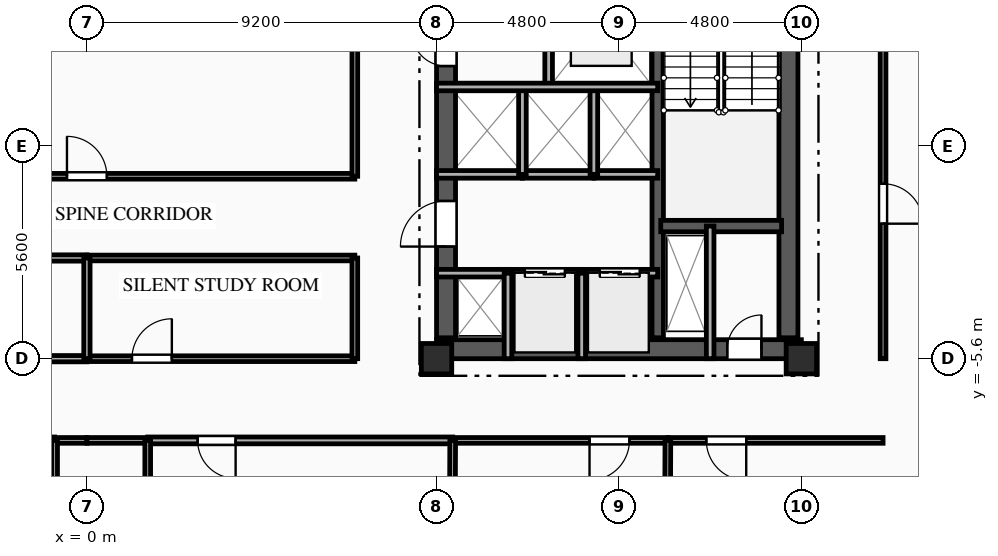
"""IFC4 building model, lengths in metres.
Left out: names, types, materials, properties, quantities, classifications, styles, units other than length and angle.
Written with IfcOpenShell. Run it as: python <this file> out.ifc"""

import sys

from ifc_helpers import new_model, si_unit, direction, frame, frame_2d, origin, origin_2d, place, context, subcontext, project, spatial, rectangle, extrude, element, fill, save


model = new_model("IFC4")
c1 = context("Model", 3, precision=1e-05, world=origin(), true_north=direction((0.0, 1.0)))
c2 = subcontext(c1, "Body", "Model", "MODEL_VIEW")
j1 = project(units=[si_unit("LENGTHUNIT", "METRE"), si_unit("PLANEANGLEUNIT", "RADIAN")], contexts=[c1])
p1 = place(None, origin())
s1 = spatial("IfcSite", under=j1, at=p1, CompositionType="ELEMENT")
p2 = place(p1, origin())
s2 = spatial("IfcBuilding", under=s1, at=p2, CompositionType="ELEMENT")
p3 = place(p2, frame((0.0, 0.0, 186.35)))
s3 = spatial("IfcBuildingStorey", under=s2, at=p3, CompositionType="ELEMENT", Elevation=186.35)
for number, where, z_axis, x_axis in (
    (1, (9.2, -5.6, 0.0), (0.0, 0.0, 1.0), (1.0, 0.0, 0.0)),
    (2, (18.8, -5.6, 0.0), (0.0, 0.0, 1.0), (1.0, 0.0, 0.0)),
):
    element("IfcColumn", number, at=place(p3, frame(where, z_axis=z_axis, x_axis=x_axis)), inside=s3, PredefinedType="COLUMN", context=c2, shape_type="SweptSolid", body=[
        extrude(rectangle(XDim=0.8, YDim=0.8, at=origin_2d()), origin(), (0.0, 0.0, 1.0), 3.35),
    ])
p4 = place(p3, frame((9.2, -5.35, 0.0), z_axis=(0.0, 0.0, 1.0), x_axis=(1.0, 0.0, 0.0)))
e3 = element("IfcWall", 3, at=p4, inside=s3, PredefinedType="SHEAR", context=c2, shape_type="SweptSolid", body=[
    extrude(rectangle(XDim=9.6, YDim=0.5, at=frame_2d((4.8, 0.0))), origin(), (0.0, 0.0, 1.0), 3.04),
])
p5 = place(p4, frame((7.65, 0.0, 0.0)))
e4 = element("IfcOpeningElement", 4, at=p5, cuts=e3, PredefinedType="OPENING", context=c2, shape_type="SweptSolid", body=[
    extrude(rectangle(XDim=0.9, YDim=2.1, at=frame_2d((0.45, 1.05))), frame((0.0, 0.26, 0.0), z_axis=(0.0, -1.0, 0.0), x_axis=(1.0, 0.0, 0.0)), (0.0, 0.0, 1.0), 0.52),
])
p6 = place(p3, frame((9.45, -5.05, 0.0), z_axis=(0.0, 0.0, 1.0), x_axis=(0.0, 1.0, 0.0)))
e5 = element("IfcWall", 5, at=p6, inside=s3, PredefinedType="SHEAR", context=c2, shape_type="SweptSolid", body=[
    extrude(rectangle(XDim=10.1, YDim=0.5, at=frame_2d((5.05, 0.0))), origin(), (0.0, 0.0, 1.0), 3.04),
])
p7 = place(p6, frame((7.15, 0.0, 0.0)))
e6 = element("IfcOpeningElement", 6, at=p7, cuts=e5, PredefinedType="OPENING", context=c2, shape_type="SweptSolid", body=[
    extrude(rectangle(XDim=0.9, YDim=2.1, at=frame_2d((0.45, 1.05))), frame((0.0, 0.26, 0.0), z_axis=(0.0, -1.0, 0.0), x_axis=(1.0, 0.0, 0.0)), (0.0, 0.0, 1.0), 0.52),
])
p8 = place(p6, frame((2.4, 0.0, 0.0)))
e7 = element("IfcOpeningElement", 7, at=p8, cuts=e5, PredefinedType="OPENING", context=c2, shape_type="SweptSolid", body=[
    extrude(rectangle(XDim=1.2, YDim=2.15, at=frame_2d((0.6, 1.075))), frame((0.0, 0.26, 0.0), z_axis=(0.0, -1.0, 0.0), x_axis=(1.0, 0.0, 0.0)), (0.0, 0.0, 1.0), 0.52),
])
p9 = place(p3, frame((18.46, -5.05, 0.0), z_axis=(0.0, 0.0, 1.0), x_axis=(0.0, 1.0, 0.0)))
e8 = element("IfcWall", 8, at=p9, inside=s3, PredefinedType="SHEAR", context=c2, shape_type="SweptSolid", body=[
    extrude(rectangle(XDim=10.1, YDim=0.5, at=frame_2d((5.05, 0.0))), origin(), (0.0, 0.0, 1.0), 3.04),
])
p10 = place(p3, frame((15.02, -5.05, 0.0), z_axis=(0.0, 0.0, 1.0), x_axis=(0.0, 1.0, 0.0)))
e9 = element("IfcWall", 9, at=p10, inside=s3, PredefinedType="SHEAR", context=c2, shape_type="SweptSolid", body=[
    extrude(rectangle(XDim=10.1, YDim=0.3, at=frame_2d((5.05, 0.0))), origin(), (0.0, 0.0, 1.0), 3.04),
])
p11 = place(p3, frame((15.1, -2.11, 0.0), z_axis=(0.0, 0.0, 1.0), x_axis=(1.0, 0.0, 0.0)))
e10 = element("IfcWall", 10, at=p11, inside=s3, PredefinedType="SHEAR", context=c2, shape_type="SweptSolid", body=[
    extrude(rectangle(XDim=3.18, YDim=0.3, at=frame_2d((1.59, 0.0))), origin(), (0.0, 0.0, 1.0), 3.04),
])
p12 = place(p3, frame((16.4, -2.11, 0.0), z_axis=(0.0, 0.0, 1.0), x_axis=(0.0, -1.0, 0.0)))
e11 = element("IfcWall", 11, at=p12, inside=s3, PredefinedType="PARTITIONING", context=c2, shape_type="SweptSolid", body=[
    extrude(rectangle(XDim=3.49, YDim=0.2, at=frame_2d((1.745, 0.0))), origin(), (0.0, 0.0, 1.0), 3.04),
])
p13 = place(p3, frame((12.15, 5.6, 0.0), z_axis=(0.0, 0.0, 1.0), x_axis=(0.0, -1.0, 0.0)))
e12 = element("IfcWall", 12, at=p13, inside=s3, PredefinedType="PARTITIONING", context=c2, shape_type="SweptSolid", body=[
    extrude(rectangle(XDim=4.05, YDim=0.2, at=frame_2d((2.025, 0.0))), origin(), (0.0, 0.0, 1.0), 3.04),
])
p14 = place(p3, frame((9.2, -3.35, 0.0), z_axis=(0.0, 0.0, 1.0), x_axis=(1.0, 0.0, 0.0)))
e13 = element("IfcWall", 13, at=p14, inside=s3, PredefinedType="PARTITIONING", context=c2, shape_type="SweptSolid", body=[
    extrude(rectangle(XDim=1.88, YDim=0.2, at=frame_2d((0.94, 0.0))), origin(), (0.0, 0.0, 1.0), 2.755),
])
p15 = place(p3, frame((11.08, -3.35, 0.0), z_axis=(0.0, 0.0, 1.0), x_axis=(1.0, 0.0, 0.0)))
e14 = element("IfcWall", 14, at=p15, inside=s3, PredefinedType="PARTITIONING", context=c2, shape_type="SweptSolid", body=[
    extrude(rectangle(XDim=1.94, YDim=0.2, at=frame_2d((0.97, 0.0))), origin(), (0.0, 0.0, 1.0), 3.04),
])
p16 = place(p15, frame((0.445, 0.0, 0.0)))
e15 = element("IfcOpeningElement", 15, at=p16, cuts=e14, PredefinedType="OPENING", context=c2, shape_type="SweptSolid", body=[
    extrude(rectangle(XDim=1.05, YDim=2.1, at=frame_2d((0.525, 1.05))), frame((0.0, 0.11, 0.0), z_axis=(0.0, -1.0, 0.0), x_axis=(1.0, 0.0, 0.0)), (0.0, 0.0, 1.0), 0.22),
])
p17 = place(p3, frame((13.02, -3.35, 0.0), z_axis=(0.0, 0.0, 1.0), x_axis=(1.0, 0.0, 0.0)))
e16 = element("IfcWall", 16, at=p17, inside=s3, PredefinedType="PARTITIONING", context=c2, shape_type="SweptSolid", body=[
    extrude(rectangle(XDim=2.0, YDim=0.2, at=frame_2d((1.0, 0.0))), origin(), (0.0, 0.0, 1.0), 3.04),
])
p18 = place(p17, frame((0.475, 0.0, 0.0)))
e17 = element("IfcOpeningElement", 17, at=p18, cuts=e16, PredefinedType="OPENING", context=c2, shape_type="SweptSolid", body=[
    extrude(rectangle(XDim=1.05, YDim=2.1, at=frame_2d((0.525, 1.05))), frame((0.0, 0.11, 0.0), z_axis=(0.0, -1.0, 0.0), x_axis=(1.0, 0.0, 0.0)), (0.0, 0.0, 1.0), 0.22),
])
p19 = place(p3, frame((11.46, -0.75, 0.0), z_axis=(0.0, 0.0, 1.0), x_axis=(-1.0, 0.0, 0.0)))
e18 = element("IfcWall", 18, at=p19, inside=s3, PredefinedType="PARTITIONING", context=c2, shape_type="SweptSolid", body=[
    extrude(rectangle(XDim=2.26, YDim=0.2, at=frame_2d((1.13, 0.0))), origin(), (0.0, 0.0, 1.0), 3.04),
])
p20 = place(p3, frame((13.34, -0.75, 0.0), z_axis=(0.0, 0.0, 1.0), x_axis=(-1.0, 0.0, 0.0)))
e19 = element("IfcWall", 19, at=p20, inside=s3, PredefinedType="PARTITIONING", context=c2, shape_type="SweptSolid", body=[
    extrude(rectangle(XDim=1.88, YDim=0.2, at=frame_2d((0.94, 0.0))), origin(), (0.0, 0.0, 1.0), 3.04),
])
p21 = place(p3, frame((15.02, -0.75, 0.0), z_axis=(0.0, 0.0, 1.0), x_axis=(-1.0, 0.0, 0.0)))
e20 = element("IfcWall", 20, at=p21, inside=s3, PredefinedType="PARTITIONING", context=c2, shape_type="SweptSolid", body=[
    extrude(rectangle(XDim=1.68, YDim=0.2, at=frame_2d((0.84, 0.0))), origin(), (0.0, 0.0, 1.0), 3.04),
])
for number, where, z_axis, x_axis in (
    (21, (11.08, -5.6, 0.0), (0.0, 0.0, 1.0), (0.0, 1.0, 0.0)),
    (22, (13.02, -5.6, 0.0), (0.0, 0.0, 1.0), (0.0, 1.0, 0.0)),
):
    element("IfcWall", number, at=place(p3, frame(where, z_axis=z_axis, x_axis=x_axis)), inside=s3, PredefinedType="PARTITIONING", context=c2, shape_type="SweptSolid", body=[
        extrude(rectangle(XDim=2.25, YDim=0.2, at=frame_2d((1.125, 0.0))), origin(), (0.0, 0.0, 1.0), 3.04),
    ])
for number, where, z_axis, x_axis in (
    (23, (11.46, -0.75, 0.0), (0.0, 0.0, 1.0), (0.0, 1.0, 0.0)),
    (24, (13.34, -0.75, 0.0), (0.0, 0.0, 1.0), (0.0, 1.0, 0.0)),
):
    element("IfcWall", number, at=place(p3, frame(where, z_axis=z_axis, x_axis=x_axis)), inside=s3, PredefinedType="PARTITIONING", context=c2, shape_type="SweptSolid", body=[
        extrude(rectangle(XDim=2.3, YDim=0.2, at=frame_2d((1.15, 0.0))), origin(), (0.0, 0.0, 1.0), 3.04),
    ])
p22 = place(p3, frame((-0.85, -7.75, 0.0), z_axis=(0.0, 0.0, 1.0), x_axis=(-1.0, 0.0, 0.0)))
e25 = element("IfcWall", 25, at=p22, inside=s3, PredefinedType="PARTITIONING", context=c2, shape_type="SweptSolid", body=[
    extrude(rectangle(XDim=8.025, YDim=0.18, at=frame_2d((4.012, 0.0))), origin(), (0.0, 0.0, 1.0), 3.04),
])
p23 = place(p22, frame((1.313, 0.0, 0.0)))
e26 = element("IfcOpeningElement", 26, at=p23, cuts=e25, PredefinedType="OPENING", context=c2, shape_type="SweptSolid", body=[
    extrude(rectangle(XDim=1.0, YDim=2.15, at=frame_2d((0.5, 1.075))), frame((0.0, 0.1, 0.0), z_axis=(0.0, -1.0, 0.0), x_axis=(1.0, 0.0, 0.0)), (0.0, 0.0, 1.0), 0.2),
])
p24 = place(p3, frame((0.0, -7.75, 0.0), z_axis=(0.0, 0.0, 1.0), x_axis=(-1.0, 0.0, 0.0)))
e27 = element("IfcWall", 27, at=p24, inside=s3, PredefinedType="PLUMBINGWALL", context=c2, shape_type="SweptSolid", body=[
    extrude(rectangle(XDim=0.85, YDim=0.15, at=frame_2d((0.425, 0.0))), origin(), (0.0, 0.0, 1.0), 3.04),
])
p25 = place(p3, frame((-7.05, -5.6, 0.0), z_axis=(0.0, 0.0, 1.0), x_axis=(1.0, 0.0, 0.0)))
e28 = element("IfcWall", 28, at=p25, inside=s3, PredefinedType="PARTITIONING", context=c2, shape_type="SweptSolid", body=[
    extrude(rectangle(XDim=7.05, YDim=0.165, at=frame_2d((3.525, 0.0))), origin(), (0.0, 0.0, 1.0), 2.525),
])
p26 = place(p25, frame((4.728, 0.0, 0.0)))
e29 = element("IfcOpeningElement", 29, at=p26, cuts=e28, PredefinedType="OPENING", context=c2, shape_type="SweptSolid", body=[
    extrude(rectangle(XDim=1.15, YDim=2.15, at=frame_2d((0.575, 1.075))), frame((0.0, 0.093, 0.0), z_axis=(0.0, -1.0, 0.0), x_axis=(1.0, 0.0, 0.0)), (0.0, 0.0, 1.0), 0.185),
])
p27 = place(p3, frame((9.625, -7.75, 0.0), z_axis=(0.0, 0.0, 1.0), x_axis=(-1.0, 0.0, 0.0)))
e30 = element("IfcWall", 30, at=p27, inside=s3, PredefinedType="PARTITIONING", context=c2, shape_type="SweptSolid", body=[
    extrude(rectangle(XDim=8.025, YDim=0.18, at=frame_2d((4.012, 0.0))), origin(), (0.0, 0.0, 1.0), 3.04),
])
p28 = place(p27, frame((5.712, 0.0, 0.0)))
e31 = element("IfcOpeningElement", 31, at=p28, cuts=e30, PredefinedType="OPENING", context=c2, shape_type="SweptSolid", body=[
    extrude(rectangle(XDim=1.0, YDim=2.15, at=frame_2d((0.5, 1.075))), frame((0.0, 0.1, 0.0), z_axis=(0.0, -1.0, 0.0), x_axis=(1.0, 0.0, 0.0)), (0.0, 0.0, 1.0), 0.2),
])
p29 = place(p3, frame((1.6, -7.75, 0.0), z_axis=(0.0, 0.0, 1.0), x_axis=(-1.0, 0.0, 0.0)))
e32 = element("IfcWall", 32, at=p29, inside=s3, PredefinedType="PLUMBINGWALL", context=c2, shape_type="SweptSolid", body=[
    extrude(rectangle(XDim=1.6, YDim=0.15, at=frame_2d((0.8, 0.0))), origin(), (0.0, 0.0, 1.0), 3.04),
])
p30 = place(p3, frame((15.288, -7.75, 0.0), z_axis=(0.0, 0.0, 1.0), x_axis=(-1.0, 0.0, 0.0)))
e33 = element("IfcWall", 33, at=p30, inside=s3, PredefinedType="PARTITIONING", context=c2, shape_type="SweptSolid", body=[
    extrude(rectangle(XDim=5.663, YDim=0.15, at=frame_2d((2.831, 0.0))), origin(), (0.0, 0.0, 1.0), 3.04),
])
p31 = place(p30, frame((1.012, 0.0, 0.0)))
e34 = element("IfcOpeningElement", 34, at=p31, cuts=e33, PredefinedType="OPENING", context=c2, shape_type="SweptSolid", body=[
    extrude(rectangle(XDim=1.05, YDim=2.15, at=frame_2d((0.525, 1.075))), frame((0.0, 0.085, 0.0), z_axis=(0.0, -1.0, 0.0), x_axis=(1.0, 0.0, 0.0)), (0.0, 0.0, 1.0), 0.17),
])
p32 = place(p3, frame((20.95, -7.75, 0.0), z_axis=(0.0, 0.0, 1.0), x_axis=(-1.0, 0.0, 0.0)))
e35 = element("IfcWall", 35, at=p32, inside=s3, PredefinedType="PARTITIONING", context=c2, shape_type="SweptSolid", body=[
    extrude(rectangle(XDim=5.662, YDim=0.15, at=frame_2d((2.831, 0.0))), origin(), (0.0, 0.0, 1.0), 3.04),
])
p33 = place(p32, frame((3.601, 0.0, 0.0)))
e36 = element("IfcOpeningElement", 36, at=p33, cuts=e35, PredefinedType="OPENING", context=c2, shape_type="SweptSolid", body=[
    extrude(rectangle(XDim=1.05, YDim=2.15, at=frame_2d((0.525, 1.075))), frame((0.0, 0.085, 0.0), z_axis=(0.0, -1.0, 0.0), x_axis=(1.0, 0.0, 0.0)), (0.0, 0.0, 1.0), 0.17),
])
p34 = place(p3, frame((0.0, -5.6, 0.0), z_axis=(0.0, 0.0, 1.0), x_axis=(1.0, 0.0, 0.0)))
e37 = element("IfcWall", 37, at=p34, inside=s3, PredefinedType="PARTITIONING", context=c2, shape_type="SweptSolid", body=[
    extrude(rectangle(XDim=7.05, YDim=0.15, at=frame_2d((3.525, 0.0))), origin(), (0.0, 0.0, 1.0), 2.525),
])
p35 = place(p34, frame((1.185, 0.0, 0.0)))
e38 = element("IfcOpeningElement", 38, at=p35, cuts=e37, PredefinedType="OPENING", context=c2, shape_type="SweptSolid", body=[
    extrude(rectangle(XDim=1.05, YDim=2.15, at=frame_2d((0.525, 1.075))), frame((0.0, 0.085, 0.0), z_axis=(0.0, -1.0, 0.0), x_axis=(1.0, 0.0, 0.0)), (0.0, 0.0, 1.0), 0.17),
])
p36 = place(p3, frame((20.95, 8.5, 0.0), z_axis=(0.0, 0.0, 1.0), x_axis=(0.0, -1.0, 0.0)))
e39 = element("IfcWall", 39, at=p36, inside=s3, PredefinedType="PARTITIONING", context=c2, shape_type="SweptSolid", body=[
    extrude(rectangle(XDim=14.1, YDim=0.15, at=frame_2d((7.05, 0.0))), origin(), (0.0, 0.0, 1.0), 2.695),
])
p37 = place(p36, frame((9.498, 0.0, 0.0)))
e40 = element("IfcOpeningElement", 40, at=p37, cuts=e39, PredefinedType="OPENING", context=c2, shape_type="SweptSolid", body=[
    extrude(rectangle(XDim=1.05, YDim=2.15, at=frame_2d((0.525, 1.075))), frame((0.0, 0.085, 0.0), z_axis=(0.0, -1.0, 0.0), x_axis=(1.0, 0.0, 0.0)), (0.0, 0.0, 1.0), 0.17),
])
p38 = place(p3, frame((-7.05, -0.8, 0.0), z_axis=(0.0, 0.0, 1.0), x_axis=(1.0, 0.0, 0.0)))
e41 = element("IfcWall", 41, at=p38, inside=s3, PredefinedType="PARTITIONING", context=c2, shape_type="SweptSolid", body=[
    extrude(rectangle(XDim=14.1, YDim=0.15, at=frame_2d((7.05, 0.0))), origin(), (0.0, 0.0, 1.0), 3.04),
])
p39 = place(p38, frame((6.525, 0.0, 0.0)))
e42 = element("IfcOpeningElement", 42, at=p39, cuts=e41, PredefinedType="OPENING", context=c2, shape_type="SweptSolid", body=[
    extrude(rectangle(XDim=1.05, YDim=2.15, at=frame_2d((0.525, 1.075))), frame((0.0, 0.085, 0.0), z_axis=(0.0, -1.0, 0.0), x_axis=(1.0, 0.0, 0.0)), (0.0, 0.0, 1.0), 0.17),
])
p40 = place(p3, frame((0.0, -2.95, 0.0), z_axis=(0.0, 0.0, 1.0), x_axis=(-1.0, 0.0, 0.0)))
e43 = element("IfcWall", 43, at=p40, inside=s3, PredefinedType="PARTITIONING", context=c2, shape_type="SweptSolid", body=[
    extrude(rectangle(XDim=7.05, YDim=0.165, at=frame_2d((3.525, 0.0))), origin(), (0.0, 0.0, 1.0), 3.04),
])
p41 = place(p3, frame((7.05, -2.95, 0.0), z_axis=(0.0, 0.0, 1.0), x_axis=(-1.0, 0.0, 0.0)))
e44 = element("IfcWall", 44, at=p41, inside=s3, PredefinedType="PARTITIONING", context=c2, shape_type="SweptSolid", body=[
    extrude(rectangle(XDim=7.05, YDim=0.15, at=frame_2d((3.525, 0.0))), origin(), (0.0, 0.0, 1.0), 3.04),
])
p42 = place(p3, frame((7.05, -0.8, 0.0), z_axis=(0.0, 0.0, 1.0), x_axis=(0.0, 1.0, 0.0)))
e45 = element("IfcWall", 45, at=p42, inside=s3, PredefinedType="PARTITIONING", context=c2, shape_type="SweptSolid", body=[
    extrude(rectangle(XDim=9.3, YDim=0.15, at=frame_2d((4.65, 0.0))), origin(), (0.0, 0.0, 1.0), 3.04),
])
p43 = place(p3, frame((7.05, -5.6, 0.0), z_axis=(0.0, 0.0, 1.0), x_axis=(0.0, 1.0, 0.0)))
e46 = element("IfcWall", 46, at=p43, inside=s3, PredefinedType="PARTITIONING", context=c2, shape_type="SweptSolid", body=[
    extrude(rectangle(XDim=2.65, YDim=0.15, at=frame_2d((1.325, 0.0))), origin(), (0.0, 0.0, 1.0), 3.04),
])
for number, where, z_axis, x_axis in (
    (47, (-0.85, -7.75, 0.0), (0.0, 0.0, 1.0), (0.0, -1.0, 0.0)),
    (48, (1.6, -9.9, 0.0), (0.0, 0.0, 1.0), (0.0, 1.0, 0.0)),
):
    element("IfcWall", number, at=place(p3, frame(where, z_axis=z_axis, x_axis=x_axis)), inside=s3, PredefinedType="PLUMBINGWALL", context=c2, shape_type="SweptSolid", body=[
        extrude(rectangle(XDim=2.15, YDim=0.15, at=frame_2d((1.075, 0.0))), origin(), (0.0, 0.0, 1.0), 3.04),
    ])
p44 = place(p3, frame((9.625, -7.75, 0.0), z_axis=(0.0, 0.0, 1.0), x_axis=(-0.004074945792, -0.999991697374, 0.0)))
e49 = element("IfcWall", 49, at=p44, inside=s3, PredefinedType="PARTITIONING", context=c2, shape_type="SweptSolid", body=[
    extrude(rectangle(XDim=10.784, YDim=0.15, at=frame_2d((5.392, 0.0))), origin(), (0.0, 0.0, 1.0), 3.04),
])
p45 = place(p3, frame((15.288, -7.75, 0.0), z_axis=(0.0, 0.0, 1.0), x_axis=(-0.003861886282, -0.999992542889, 0.0)))
e50 = element("IfcWall", 50, at=p45, inside=s3, PredefinedType="PARTITIONING", context=c2, shape_type="SweptSolid", body=[
    extrude(rectangle(XDim=11.379, YDim=0.15, at=frame_2d((5.689, 0.0))), origin(), (0.0, 0.0, 1.0), 3.04),
])
p46 = place(p3, frame((0.0, -2.95, 0.0), z_axis=(0.0, 0.0, 1.0), x_axis=(0.0, -1.0, 0.0)))
e51 = element("IfcWall", 51, at=p46, inside=s3, PredefinedType="PARTITIONING", context=c2, shape_type="SweptSolid", body=[
    extrude(rectangle(XDim=2.65, YDim=0.165, at=frame_2d((1.325, 0.0))), origin(), (0.0, 0.0, 1.0), 3.04),
])
p47 = place(p3, frame((9.2, 1.55, 0.0), z_axis=(0.0, 0.0, 1.0), x_axis=(1.0, 0.0, 0.0)))
e52 = element("IfcWall", 52, at=p47, inside=s3, PredefinedType="PARTITIONING", context=c2, shape_type="SweptSolid", body=[
    extrude(rectangle(XDim=5.82, YDim=0.2, at=frame_2d((2.91, 0.0))), origin(), (0.0, 0.0, 1.0), 3.04),
])
p48 = place(p5, origin())
e53 = element("IfcDoor", 53, at=p48, inside=s3, OperationType="SINGLE_SWING_RIGHT", PredefinedType="DOOR", context=c2, shape_type="SweptSolid", body=[
    extrude(rectangle(XDim=0.9, YDim=2.1, at=frame_2d((0.45, 1.05))), frame((0.0, 0.025, 0.0), z_axis=(0.0, -1.0, 0.0), x_axis=(1.0, 0.0, 0.0)), (0.0, 0.0, 1.0), 0.05),
])
fill(e4, e53)
p49 = place(p7, origin())
e54 = element("IfcDoor", 54, at=p49, inside=s3, OperationType="SINGLE_SWING_RIGHT", PredefinedType="DOOR", context=c2, shape_type="SweptSolid", body=[
    extrude(rectangle(XDim=0.9, YDim=2.1, at=frame_2d((0.45, 1.05))), frame((0.0, 0.025, 0.0), z_axis=(0.0, -1.0, 0.0), x_axis=(1.0, 0.0, 0.0)), (0.0, 0.0, 1.0), 0.05),
])
fill(e6, e54)
p50 = place(p16, origin())
e55 = element("IfcDoor", 55, at=p50, inside=s3, OperationType="DOUBLE_DOOR_SLIDING", PredefinedType="DOOR", context=c2, shape_type="SweptSolid", body=[
    extrude(rectangle(XDim=1.05, YDim=2.1, at=frame_2d((0.525, 1.05))), frame((0.0, 0.025, 0.0), z_axis=(0.0, -1.0, 0.0), x_axis=(1.0, 0.0, 0.0)), (0.0, 0.0, 1.0), 0.05),
])
fill(e15, e55)
p51 = place(p18, origin())
e56 = element("IfcDoor", 56, at=p51, inside=s3, OperationType="DOUBLE_DOOR_SLIDING", PredefinedType="DOOR", context=c2, shape_type="SweptSolid", body=[
    extrude(rectangle(XDim=1.05, YDim=2.1, at=frame_2d((0.525, 1.05))), frame((0.0, 0.025, 0.0), z_axis=(0.0, -1.0, 0.0), x_axis=(1.0, 0.0, 0.0)), (0.0, 0.0, 1.0), 0.05),
])
fill(e17, e56)
p52 = place(p8, origin())
e57 = element("IfcDoor", 57, at=p52, inside=s3, OperationType="SINGLE_SWING_LEFT", PredefinedType="DOOR", context=c2, shape_type="SweptSolid", body=[
    extrude(rectangle(XDim=1.2, YDim=2.15, at=frame_2d((0.6, 1.075))), frame((0.0, 0.025, 0.0), z_axis=(0.0, -1.0, 0.0), x_axis=(1.0, 0.0, 0.0)), (0.0, 0.0, 1.0), 0.05),
])
fill(e7, e57)
p53 = place(p28, origin())
e58 = element("IfcDoor", 58, at=p53, inside=s3, OperationType="SINGLE_SWING_LEFT", PredefinedType="DOOR", context=c2, shape_type="SweptSolid", body=[
    extrude(rectangle(XDim=1.0, YDim=2.15, at=frame_2d((0.5, 1.075))), frame((0.0, 0.025, 0.0), z_axis=(0.0, -1.0, 0.0), x_axis=(1.0, 0.0, 0.0)), (0.0, 0.0, 1.0), 0.05),
])
fill(e31, e58)
p54 = place(p31, origin())
e59 = element("IfcDoor", 59, at=p54, inside=s3, OperationType="SINGLE_SWING_RIGHT", PredefinedType="DOOR", context=c2, shape_type="SweptSolid", body=[
    extrude(rectangle(XDim=1.05, YDim=2.15, at=frame_2d((0.525, 1.075))), frame((0.0, 0.025, 0.0), z_axis=(0.0, -1.0, 0.0), x_axis=(1.0, 0.0, 0.0)), (0.0, 0.0, 1.0), 0.05),
])
fill(e34, e59)
p55 = place(p33, origin())
e60 = element("IfcDoor", 60, at=p55, inside=s3, OperationType="SINGLE_SWING_LEFT", PredefinedType="DOOR", context=c2, shape_type="SweptSolid", body=[
    extrude(rectangle(XDim=1.05, YDim=2.15, at=frame_2d((0.525, 1.075))), frame((0.0, 0.025, 0.0), z_axis=(0.0, -1.0, 0.0), x_axis=(1.0, 0.0, 0.0)), (0.0, 0.0, 1.0), 0.05),
])
fill(e36, e60)
p56 = place(p35, origin())
e61 = element("IfcDoor", 61, at=p56, inside=s3, OperationType="SINGLE_SWING_RIGHT", PredefinedType="DOOR", context=c2, shape_type="SweptSolid", body=[
    extrude(rectangle(XDim=1.05, YDim=2.15, at=frame_2d((0.525, 1.075))), frame((0.0, 0.025, 0.0), z_axis=(0.0, -1.0, 0.0), x_axis=(1.0, 0.0, 0.0)), (0.0, 0.0, 1.0), 0.05),
])
fill(e38, e61)
p57 = place(p37, origin())
e62 = element("IfcDoor", 62, at=p57, inside=s3, OperationType="SINGLE_SWING_RIGHT", PredefinedType="DOOR", context=c2, shape_type="SweptSolid", body=[
    extrude(rectangle(XDim=1.05, YDim=2.15, at=frame_2d((0.525, 1.075))), frame((0.0, 0.025, 0.0), z_axis=(0.0, -1.0, 0.0), x_axis=(1.0, 0.0, 0.0)), (0.0, 0.0, 1.0), 0.05),
])
fill(e40, e62)
p58 = place(p39, origin())
e63 = element("IfcDoor", 63, at=p58, inside=s3, OperationType="SINGLE_SWING_LEFT", PredefinedType="DOOR", context=c2, shape_type="SweptSolid", body=[
    extrude(rectangle(XDim=1.05, YDim=2.15, at=frame_2d((0.525, 1.075))), frame((0.0, 0.025, 0.0), z_axis=(0.0, -1.0, 0.0), x_axis=(1.0, 0.0, 0.0)), (0.0, 0.0, 1.0), 0.05),
])
fill(e42, e63)
save(model, sys.argv[1])
